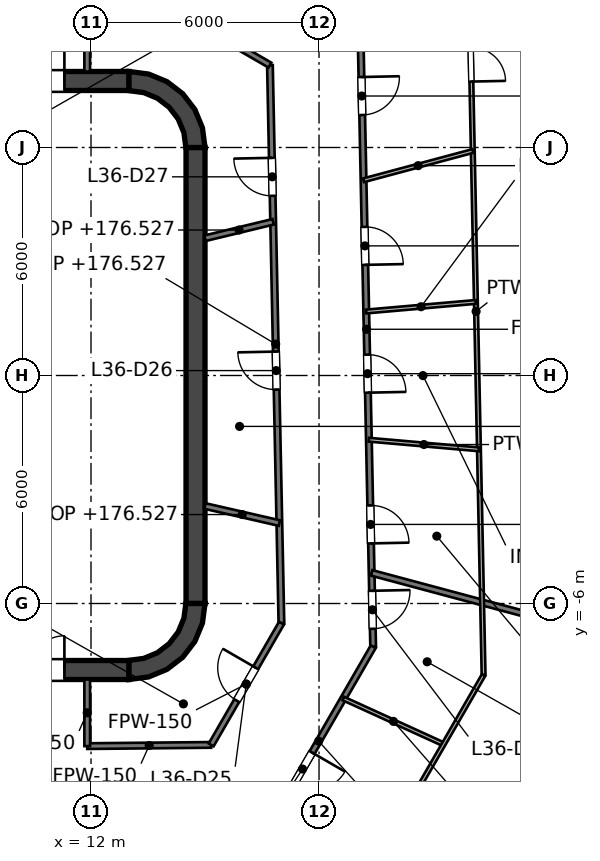
"""IFC4 building model, lengths in metres.
Left out: names, types, materials, properties, quantities, classifications, styles, units other than length and angle.
Written with IfcOpenShell. Run it as: python <this file> out.ifc"""

import sys

from ifc_helpers import new_model, si_unit, direction, frame, frame_2d, origin, place, context, subcontext, project, spatial, polyline, rectangle, outline, extrude, element, fill, save


model = new_model("IFC4")
c1 = context("Model", 3, precision=1e-05, world=origin(), true_north=direction((0.0, 1.0)))
c2 = subcontext(c1, "Body", "Model", "MODEL_VIEW")
j1 = project(units=[si_unit("LENGTHUNIT", "METRE"), si_unit("PLANEANGLEUNIT", "RADIAN")], contexts=[c1])
p1 = place(None, origin())
s1 = spatial("IfcSite", under=j1, at=p1, CompositionType="ELEMENT")
p2 = place(p1, origin())
s2 = spatial("IfcBuilding", under=s1, at=p2, CompositionType="ELEMENT")
p3 = place(p2, frame((0.0, 0.0, 173.6)))
s3 = spatial("IfcBuildingStorey", under=s2, at=p3, CompositionType="ELEMENT", Elevation=173.6)
p4 = place(p3, frame((-13.0, 7.75, 0.0), z_axis=(0.0, 0.0, 1.0), x_axis=(1.0, 0.0, 0.0)))
e1 = element("IfcWall", 1, at=p4, inside=s3, PredefinedType="SHEAR", context=c2, shape_type="SweptSolid", body=[
    extrude(rectangle(XDim=26.0, YDim=0.5, at=frame_2d((13.0, 0.0))), origin(), (0.0, 0.0, 1.0), 4.0),
])
p5 = place(p4, frame((1.7, 0.0, 0.0)))
e2 = element("IfcOpeningElement", 2, at=p5, cuts=e1, PredefinedType="OPENING", context=c2, shape_type="SweptSolid", body=[
    extrude(rectangle(XDim=1.8, YDim=2.1, at=frame_2d((0.9, 1.05))), frame((0.0, 0.25, 0.0), z_axis=(0.0, -1.0, 0.0), x_axis=(1.0, 0.0, 0.0)), (0.0, 0.0, 1.0), 0.5),
])
p6 = place(p4, frame((22.5, 0.0, 0.0)))
e3 = element("IfcOpeningElement", 3, at=p6, cuts=e1, PredefinedType="OPENING", context=c2, shape_type="SweptSolid", body=[
    extrude(rectangle(XDim=1.8, YDim=2.1, at=frame_2d((0.9, 1.05))), frame((0.0, 0.25, 0.0), z_axis=(0.0, -1.0, 0.0), x_axis=(1.0, 0.0, 0.0)), (0.0, 0.0, 1.0), 0.5),
])
p7 = place(p3, frame((-13.0, -7.75, 0.0), z_axis=(0.0, 0.0, 1.0), x_axis=(1.0, 0.0, 0.0)))
e4 = element("IfcWall", 4, at=p7, inside=s3, PredefinedType="SHEAR", context=c2, shape_type="SweptSolid", body=[
    extrude(rectangle(XDim=26.0, YDim=0.5, at=frame_2d((13.0, 0.0))), origin(), (0.0, 0.0, 1.0), 4.0),
])
p8 = place(p7, frame((1.7, 0.0, 0.0)))
e5 = element("IfcOpeningElement", 5, at=p8, cuts=e4, PredefinedType="OPENING", context=c2, shape_type="SweptSolid", body=[
    extrude(rectangle(XDim=1.8, YDim=2.1, at=frame_2d((0.9, 1.05))), frame((0.0, 0.25, 0.0), z_axis=(0.0, -1.0, 0.0), x_axis=(1.0, 0.0, 0.0)), (0.0, 0.0, 1.0), 0.5),
])
p9 = place(p7, frame((22.5, 0.0, 0.0)))
e6 = element("IfcOpeningElement", 6, at=p9, cuts=e4, PredefinedType="OPENING", context=c2, shape_type="SweptSolid", body=[
    extrude(rectangle(XDim=1.8, YDim=2.1, at=frame_2d((0.9, 1.05))), frame((0.0, 0.25, 0.0), z_axis=(0.0, -1.0, 0.0), x_axis=(1.0, 0.0, 0.0)), (0.0, 0.0, 1.0), 0.5),
])
p10 = place(p3, frame((14.75, -6.0, 0.0), z_axis=(0.0, 0.0, 1.0), x_axis=(0.0, 1.0, 0.0)))
e7 = element("IfcWall", 7, at=p10, inside=s3, PredefinedType="SHEAR", context=c2, shape_type="SweptSolid", body=[
    extrude(rectangle(XDim=12.0, YDim=0.5, at=frame_2d((6.0, 0.0))), origin(), (0.0, 0.0, 1.0), 4.0),
])
p11 = place(p3, origin())
e8 = element("IfcWall", 8, at=p11, inside=s3, PredefinedType="SHEAR", context=c2, shape_type="SweptSolid", body=[
    extrude(outline(polyline([(13.0, 8.0), (13.0, 7.496), (13.387, 7.445), (13.748, 7.295), (14.058, 7.058), (14.295, 6.748), (14.445, 6.387), (14.496, 6.0), (15.0, 6.0), (14.932, 6.518), (14.732, 7.0), (14.414, 7.414), (14.0, 7.732), (13.518, 7.932), (13.0, 8.0)])), origin(), (0.0, 0.0, 1.0), 4.0),
])
e9 = element("IfcWall", 9, at=p11, inside=s3, PredefinedType="SHEAR", context=c2, shape_type="SweptSolid", body=[
    extrude(outline(polyline([(15.0, -6.0), (14.496, -6.0), (14.445, -6.387), (14.295, -6.748), (14.058, -7.058), (13.748, -7.295), (13.387, -7.445), (13.0, -7.496), (13.0, -8.0), (13.518, -7.932), (14.0, -7.732), (14.414, -7.414), (14.732, -7.0), (14.932, -6.518), (15.0, -6.0)])), origin(), (0.0, 0.0, 1.0), 4.0),
])
p12 = place(p3, frame((11.8, -7.5, 0.0), z_axis=(0.0, 0.0, 1.0), x_axis=(0.0, 1.0, 0.0)))
e10 = element("IfcWall", 10, at=p12, inside=s3, PredefinedType="SOLIDWALL", context=c2, shape_type="SweptSolid", body=[
    extrude(rectangle(XDim=15.0, YDim=0.4, at=frame_2d((7.5, 0.0))), origin(), (0.0, 0.0, 1.0), 3.85),
])
p13 = place(p12, frame((11.3, 0.0, 0.0)))
e11 = element("IfcOpeningElement", 11, at=p13, cuts=e10, PredefinedType="OPENING", context=c2, shape_type="SweptSolid", body=[
    extrude(rectangle(XDim=1.1, YDim=2.1, at=frame_2d((0.55, 1.05))), frame((0.0, 0.2, 0.0), z_axis=(0.0, -1.0, 0.0), x_axis=(1.0, 0.0, 0.0)), (0.0, 0.0, 1.0), 0.4),
])
p14 = place(p12, frame((8.4, 0.0, 0.0)))
e12 = element("IfcOpeningElement", 12, at=p14, cuts=e10, PredefinedType="OPENING", context=c2, shape_type="SweptSolid", body=[
    extrude(rectangle(XDim=1.1, YDim=2.1, at=frame_2d((0.55, 1.05))), frame((0.0, 0.2, 0.0), z_axis=(0.0, -1.0, 0.0), x_axis=(1.0, 0.0, 0.0)), (0.0, 0.0, 1.0), 0.4),
])
p15 = place(p12, frame((5.5, 0.0, 0.0)))
e13 = element("IfcOpeningElement", 13, at=p15, cuts=e10, PredefinedType="OPENING", context=c2, shape_type="SweptSolid", body=[
    extrude(rectangle(XDim=1.1, YDim=2.1, at=frame_2d((0.55, 1.05))), frame((0.0, 0.2, 0.0), z_axis=(0.0, -1.0, 0.0), x_axis=(1.0, 0.0, 0.0)), (0.0, 0.0, 1.0), 0.4),
])
p16 = place(p12, frame((13.697, 0.0, 0.0)))
e14 = element("IfcOpeningElement", 14, at=p16, cuts=e10, PredefinedType="OPENING", context=c2, shape_type="SweptSolid", body=[
    extrude(rectangle(XDim=0.9, YDim=2.1, at=frame_2d((0.45, 1.05))), frame((0.0, 0.2, 0.0), z_axis=(0.0, -1.0, 0.0), x_axis=(1.0, 0.0, 0.0)), (0.0, 0.0, 1.0), 0.4),
])
p17 = place(p12, frame((0.403, 0.0, 0.0)))
e15 = element("IfcOpeningElement", 15, at=p17, cuts=e10, PredefinedType="OPENING", context=c2, shape_type="SweptSolid", body=[
    extrude(rectangle(XDim=0.9, YDim=2.1, at=frame_2d((0.45, 1.05))), frame((0.0, 0.2, 0.0), z_axis=(0.0, -1.0, 0.0), x_axis=(1.0, 0.0, 0.0)), (0.0, 0.0, 1.0), 0.4),
])
e16 = element("IfcWall", 16, at=p11, inside=s3, PredefinedType="SOLIDWALL", context=c2, shape_type="SweptSolid", body=[
    extrude(outline(polyline([(12.0, -5.675), (12.0, -5.925), (14.25, -5.925), (14.5, -5.925), (14.5, -5.675), (14.5, -3.025), (14.5, -2.775), (14.5, -0.125), (14.5, 0.125), (14.5, 2.775), (14.5, 3.025), (14.5, 5.675), (14.5, 5.925), (14.25, 5.925), (12.0, 5.925), (12.0, 5.675), (14.25, 5.675), (14.25, 3.025), (12.0, 3.025), (12.0, 2.775), (14.25, 2.775), (14.25, 0.125), (12.0, 0.125), (12.0, -0.125), (14.25, -0.125), (14.25, -2.775), (12.0, -2.775), (12.0, -3.025), (14.25, -3.025), (14.25, -5.675), (12.0, -5.675)])), origin(), (0.0, 0.0, 1.0), 3.85),
])
p18 = place(p3, frame((16.708, 8.168, 0.0), z_axis=(0.0, 0.0, 1.0), x_axis=(0.020577520638, -0.999788260405, 0.0)))
e17 = element("IfcWall", 17, at=p18, inside=s3, PredefinedType="PARTITIONING", context=c2, shape_type="SweptSolid", body=[
    extrude(rectangle(XDim=14.688, YDim=0.15, at=frame_2d((7.344, 0.0))), origin(), (0.0, 0.0, 1.0), 2.927),
])
p19 = place(p18, frame((7.54, 0.0, 0.0)))
e18 = element("IfcOpeningElement", 18, at=p19, cuts=e17, PredefinedType="OPENING", context=c2, shape_type="SweptSolid", body=[
    extrude(rectangle(XDim=1.0, YDim=2.1, at=frame_2d((0.5, 1.05))), frame((0.0, 0.075, 0.0), z_axis=(0.0, -1.0, 0.0), x_axis=(1.0, 0.0, 0.0)), (0.0, 0.0, 1.0), 0.15),
])
p20 = place(p18, frame((2.44, 0.0, 0.0)))
e19 = element("IfcOpeningElement", 19, at=p20, cuts=e17, PredefinedType="OPENING", context=c2, shape_type="SweptSolid", body=[
    extrude(rectangle(XDim=1.0, YDim=2.1, at=frame_2d((0.5, 1.05))), frame((0.0, 0.075, 0.0), z_axis=(0.0, -1.0, 0.0), x_axis=(1.0, 0.0, 0.0)), (0.0, 0.0, 1.0), 0.15),
])
p21 = place(p3, frame((19.08, 9.57, 0.0), z_axis=(0.0, 0.0, 1.0), x_axis=(0.020585419538, -0.9997880978, 0.0)))
e20 = element("IfcWall", 20, at=p21, inside=s3, PredefinedType="PARTITIONING", context=c2, shape_type="SweptSolid", body=[
    extrude(rectangle(XDim=16.711, YDim=0.15, at=frame_2d((8.355, 0.0))), origin(), (0.0, 0.0, 1.0), 2.927),
])
p22 = place(p21, frame((15.239, 0.0, 0.0)))
e21 = element("IfcOpeningElement", 21, at=p22, cuts=e20, PredefinedType="OPENING", context=c2, shape_type="SweptSolid", body=[
    extrude(rectangle(XDim=1.0, YDim=2.1, at=frame_2d((0.5, 1.05))), frame((0.0, 0.075, 0.0), z_axis=(0.0, -1.0, 0.0), x_axis=(1.0, 0.0, 0.0)), (0.0, 0.0, 1.0), 0.15),
])
p23 = place(p21, frame((12.992, 0.0, 0.0)))
e22 = element("IfcOpeningElement", 22, at=p23, cuts=e20, PredefinedType="OPENING", context=c2, shape_type="SweptSolid", body=[
    extrude(rectangle(XDim=1.0, YDim=2.1, at=frame_2d((0.5, 1.05))), frame((0.0, 0.075, 0.0), z_axis=(0.0, -1.0, 0.0), x_axis=(1.0, 0.0, 0.0)), (0.0, 0.0, 1.0), 0.15),
])
p24 = place(p21, frame((9.024, 0.0, 0.0)))
e23 = element("IfcOpeningElement", 23, at=p24, cuts=e20, PredefinedType="OPENING", context=c2, shape_type="SweptSolid", body=[
    extrude(rectangle(XDim=1.0, YDim=2.1, at=frame_2d((0.5, 1.05))), frame((0.0, 0.075, 0.0), z_axis=(0.0, -1.0, 0.0), x_axis=(1.0, 0.0, 0.0)), (0.0, 0.0, 1.0), 0.15),
])
p25 = place(p21, frame((5.66, 0.0, 0.0)))
e24 = element("IfcOpeningElement", 24, at=p25, cuts=e20, PredefinedType="OPENING", context=c2, shape_type="SweptSolid", body=[
    extrude(rectangle(XDim=1.0, YDim=2.1, at=frame_2d((0.5, 1.05))), frame((0.0, 0.075, 0.0), z_axis=(0.0, -1.0, 0.0), x_axis=(1.0, 0.0, 0.0)), (0.0, 0.0, 1.0), 0.15),
])
p26 = place(p21, frame((1.716, 0.0, 0.0)))
e25 = element("IfcOpeningElement", 25, at=p26, cuts=e20, PredefinedType="OPENING", context=c2, shape_type="SweptSolid", body=[
    extrude(rectangle(XDim=1.0, YDim=2.1, at=frame_2d((0.5, 1.05))), frame((0.0, 0.075, 0.0), z_axis=(0.0, -1.0, 0.0), x_axis=(1.0, 0.0, 0.0)), (0.0, 0.0, 1.0), 0.15),
])
p27 = place(p3, frame((13.527, 10.005, 0.0), z_axis=(0.0, 0.0, 1.0), x_axis=(0.865976376876, -0.500084907484, 0.0)))
e26 = element("IfcWall", 26, at=p27, inside=s3, PredefinedType="PARTITIONING", context=c2, shape_type="SweptSolid", body=[
    extrude(rectangle(XDim=3.673, YDim=0.15, at=frame_2d((1.836, 0.0))), origin(), (0.0, 0.0, 1.0), 2.995),
])
p28 = place(p3, frame((19.384, -5.194, 0.0), z_axis=(0.0, 0.0, 1.0), x_axis=(0.965934913918, -0.258785127227, 0.0)))
e27 = element("IfcWall", 27, at=p28, inside=s3, PredefinedType="PARTITIONING", context=c2, shape_type="SweptSolid", body=[
    extrude(rectangle(XDim=10.368, YDim=0.15, at=frame_2d((5.184, 0.0))), origin(), (0.0, 0.0, 1.0), 3.527),
])
p29 = place(p3, frame((15.0, -3.435, 0.0), z_axis=(0.0, 0.0, 1.0), x_axis=(0.974785245705, -0.223145075582, 0.0)))
e28 = element("IfcWall", 28, at=p29, inside=s3, PredefinedType="PARTITIONING", context=c2, shape_type="SweptSolid", body=[
    extrude(rectangle(XDim=2.008, YDim=0.15, at=frame_2d((1.004, 0.0))), origin(), (0.0, 0.0, 1.0), 2.927),
])
p30 = place(p3, frame((11.9, -9.753, 0.0), z_axis=(0.0, 0.0, 1.0), x_axis=(0.999951172082, 0.009881976096, 0.0)))
e29 = element("IfcWall", 29, at=p30, inside=s3, PredefinedType="PARTITIONING", context=c2, shape_type="SweptSolid", body=[
    extrude(rectangle(XDim=3.261, YDim=0.15, at=frame_2d((1.631, 0.0))), origin(), (0.0, 0.0, 1.0), 2.995),
])
p31 = place(p3, frame((15.0, 3.612, 0.0), z_axis=(0.0, 0.0, 1.0), x_axis=(0.972133200519, 0.234429180027, 0.0)))
e30 = element("IfcWall", 30, at=p31, inside=s3, PredefinedType="PARTITIONING", context=c2, shape_type="SweptSolid", body=[
    extrude(rectangle(XDim=1.844, YDim=0.15, at=frame_2d((0.922, 0.0))), origin(), (0.0, 0.0, 1.0), 2.927),
])
p32 = place(p3, frame((16.555, -12.107, 0.0), z_axis=(0.0, 0.0, 1.0), x_axis=(0.500279724306, 0.865863844636, 0.0)))
e31 = element("IfcWall", 31, at=p32, inside=s3, PredefinedType="PARTITIONING", context=c2, shape_type="SweptSolid", body=[
    extrude(rectangle(XDim=5.739, YDim=0.15, at=frame_2d((2.869, 0.0))), origin(), (0.0, 0.0, 1.0), 2.995),
])
p33 = place(p32, frame((1.522, 0.0, 0.0)))
e32 = element("IfcOpeningElement", 32, at=p33, cuts=e31, PredefinedType="OPENING", context=c2, shape_type="SweptSolid", body=[
    extrude(rectangle(XDim=1.0, YDim=2.1, at=frame_2d((0.5, 1.05))), frame((0.0, 0.075, 0.0), z_axis=(0.0, -1.0, 0.0), x_axis=(1.0, 0.0, 0.0)), (0.0, 0.0, 1.0), 0.15),
])
p34 = place(p3, frame((15.161, -9.721, 0.0), z_axis=(0.0, 0.0, 1.0), x_axis=(0.500276498434, 0.865865708476, 0.0)))
e33 = element("IfcWall", 33, at=p34, inside=s3, PredefinedType="PARTITIONING", context=c2, shape_type="SweptSolid", body=[
    extrude(rectangle(XDim=3.7, YDim=0.15, at=frame_2d((1.85, 0.0))), origin(), (0.0, 0.0, 1.0), 2.995),
])
p35 = place(p34, frame((1.345, 0.0, 0.0)))
e34 = element("IfcOpeningElement", 34, at=p35, cuts=e33, PredefinedType="OPENING", context=c2, shape_type="SweptSolid", body=[
    extrude(rectangle(XDim=1.0, YDim=2.1, at=frame_2d((0.5, 1.05))), frame((0.0, 0.075, 0.0), z_axis=(0.0, -1.0, 0.0), x_axis=(1.0, 0.0, 0.0)), (0.0, 0.0, 1.0), 0.15),
])
p36 = place(p3, frame((11.9, -9.753, 0.0), z_axis=(0.0, 0.0, 1.0), x_axis=(0.0, 1.0, 0.0)))
e35 = element("IfcWall", 35, at=p36, inside=s3, PredefinedType="PARTITIONING", context=c2, shape_type="SweptSolid", body=[
    extrude(rectangle(XDim=1.753, YDim=0.15, at=frame_2d((0.876, 0.0))), origin(), (0.0, 0.0, 1.0), 2.995),
])
p37 = place(p3, frame((11.9, 8.0, 0.0), z_axis=(0.0, 0.0, 1.0), x_axis=(0.0, 1.0, 0.0)))
e36 = element("IfcWall", 36, at=p37, inside=s3, PredefinedType="PARTITIONING", context=c2, shape_type="SweptSolid", body=[
    extrude(rectangle(XDim=1.978, YDim=0.15, at=frame_2d((0.989, 0.0))), origin(), (0.0, 0.0, 1.0), 2.995),
])
p38 = place(p3, frame((21.936, 11.258, 0.0), z_axis=(0.0, 0.0, 1.0), x_axis=(0.020580799217, -0.999788192921, 0.0)))
e37 = element("IfcWall", 37, at=p38, inside=s3, PredefinedType="PARTITIONING", context=c2, shape_type="SweptSolid", body=[
    extrude(rectangle(XDim=19.146, YDim=0.1, at=frame_2d((9.573, 0.0))), origin(), (0.0, 0.0, 1.0), 2.927),
])
p39 = place(p38, frame((1.724, 0.0, 0.0)))
e38 = element("IfcOpeningElement", 38, at=p39, cuts=e37, PredefinedType="OPENING", context=c2, shape_type="SweptSolid", body=[
    extrude(rectangle(XDim=1.8, YDim=2.1, at=frame_2d((0.9, 1.05))), frame((0.0, 0.05, 0.0), z_axis=(0.0, -1.0, 0.0), x_axis=(1.0, 0.0, 0.0)), (0.0, 0.0, 1.0), 0.1),
])
p40 = place(p3, frame((18.637, -8.5, 0.0), z_axis=(0.0, 0.0, 1.0), x_axis=(0.909830186203, -0.414980761329, 0.0)))
e39 = element("IfcWall", 39, at=p40, inside=s3, PredefinedType="PARTITIONING", context=c2, shape_type="SweptSolid", body=[
    extrude(rectangle(XDim=2.904, YDim=0.1, at=frame_2d((1.452, 0.0))), origin(), (0.0, 0.0, 1.0), 3.85),
])
p41 = place(p3, frame((19.312, -1.69, 0.0), z_axis=(0.0, 0.0, 1.0), x_axis=(0.9962004602, -0.087089856452, 0.0)))
e40 = element("IfcWall", 40, at=p41, inside=s3, PredefinedType="PARTITIONING", context=c2, shape_type="SweptSolid", body=[
    extrude(rectangle(XDim=2.907, YDim=0.1, at=frame_2d((1.454, 0.0))), origin(), (0.0, 0.0, 1.0), 3.85),
])
p42 = place(p3, frame((19.242, 1.684, 0.0), z_axis=(0.0, 0.0, 1.0), x_axis=(0.99621080415, 0.086971453336, 0.0)))
e41 = element("IfcWall", 41, at=p42, inside=s3, PredefinedType="PARTITIONING", context=c2, shape_type="SweptSolid", body=[
    extrude(rectangle(XDim=2.897, YDim=0.1, at=frame_2d((1.448, 0.0))), origin(), (0.0, 0.0, 1.0), 3.85),
])
p43 = place(p3, frame((19.171, 5.137, 0.0), z_axis=(0.0, 0.0, 1.0), x_axis=(0.965953908608, 0.25871421771, 0.0)))
e42 = element("IfcWall", 42, at=p43, inside=s3, PredefinedType="PARTITIONING", context=c2, shape_type="SweptSolid", body=[
    extrude(rectangle(XDim=2.976, YDim=0.1, at=frame_2d((1.488, 0.0))), origin(), (0.0, 0.0, 1.0), 3.85),
])
p44 = place(p3, frame((18.233, -14.98, 0.0), z_axis=(0.0, 0.0, 1.0), x_axis=(0.499914179464, 0.866074946625, 0.0)))
e43 = element("IfcWall", 43, at=p44, inside=s3, PredefinedType="PARTITIONING", context=c2, shape_type="SweptSolid", body=[
    extrude(rectangle(XDim=8.194, YDim=0.1, at=frame_2d((4.097, 0.0))), origin(), (0.0, 0.0, 1.0), 2.995),
])
p45 = place(p13, origin())
e44 = element("IfcDoor", 44, at=p45, inside=s3, OperationType="DOUBLE_DOOR_SLIDING", PredefinedType="DOOR", context=c2, shape_type="SweptSolid", body=[
    extrude(rectangle(XDim=1.1, YDim=2.1, at=frame_2d((0.55, 1.05))), frame((0.0, 0.025, 0.0), z_axis=(0.0, -1.0, 0.0), x_axis=(1.0, 0.0, 0.0)), (0.0, 0.0, 1.0), 0.05),
])
fill(e11, e44)
p46 = place(p14, origin())
e45 = element("IfcDoor", 45, at=p46, inside=s3, OperationType="DOUBLE_DOOR_SLIDING", PredefinedType="DOOR", context=c2, shape_type="SweptSolid", body=[
    extrude(rectangle(XDim=1.1, YDim=2.1, at=frame_2d((0.55, 1.05))), frame((0.0, 0.025, 0.0), z_axis=(0.0, -1.0, 0.0), x_axis=(1.0, 0.0, 0.0)), (0.0, 0.0, 1.0), 0.05),
])
fill(e12, e45)
p47 = place(p15, origin())
e46 = element("IfcDoor", 46, at=p47, inside=s3, OperationType="DOUBLE_DOOR_SLIDING", PredefinedType="DOOR", context=c2, shape_type="SweptSolid", body=[
    extrude(rectangle(XDim=1.1, YDim=2.1, at=frame_2d((0.55, 1.05))), frame((0.0, 0.025, 0.0), z_axis=(0.0, -1.0, 0.0), x_axis=(1.0, 0.0, 0.0)), (0.0, 0.0, 1.0), 0.05),
])
fill(e13, e46)
p48 = place(p16, origin())
e47 = element("IfcDoor", 47, at=p48, inside=s3, OperationType="SINGLE_SWING_RIGHT", PredefinedType="DOOR", context=c2, shape_type="SweptSolid", body=[
    extrude(rectangle(XDim=0.9, YDim=2.1, at=frame_2d((0.45, 1.05))), frame((0.0, 0.025, 0.0), z_axis=(0.0, -1.0, 0.0), x_axis=(1.0, 0.0, 0.0)), (0.0, 0.0, 1.0), 0.05),
])
fill(e14, e47)
p49 = place(p17, origin())
e48 = element("IfcDoor", 48, at=p49, inside=s3, OperationType="SINGLE_SWING_RIGHT", PredefinedType="DOOR", context=c2, shape_type="SweptSolid", body=[
    extrude(rectangle(XDim=0.9, YDim=2.1, at=frame_2d((0.45, 1.05))), frame((0.0, 0.025, 0.0), z_axis=(0.0, -1.0, 0.0), x_axis=(1.0, 0.0, 0.0)), (0.0, 0.0, 1.0), 0.05),
])
fill(e15, e48)
p50 = place(p6, origin())
e49 = element("IfcDoor", 49, at=p50, inside=s3, OperationType="DOUBLE_DOOR_SINGLE_SWING", PredefinedType="DOOR", context=c2, shape_type="SweptSolid", body=[
    extrude(rectangle(XDim=1.8, YDim=2.1, at=frame_2d((0.9, 1.05))), frame((0.0, 0.025, 0.0), z_axis=(0.0, -1.0, 0.0), x_axis=(1.0, 0.0, 0.0)), (0.0, 0.0, 1.0), 0.05),
])
fill(e3, e49)
p51 = place(p9, origin())
e50 = element("IfcDoor", 50, at=p51, inside=s3, OperationType="DOUBLE_DOOR_SINGLE_SWING", PredefinedType="DOOR", context=c2, shape_type="SweptSolid", body=[
    extrude(rectangle(XDim=1.8, YDim=2.1, at=frame_2d((0.9, 1.05))), frame((0.0, 0.025, 0.0), z_axis=(0.0, -1.0, 0.0), x_axis=(1.0, 0.0, 0.0)), (0.0, 0.0, 1.0), 0.05),
])
fill(e6, e50)
p52 = place(p35, origin())
e51 = element("IfcDoor", 51, at=p52, inside=s3, OperationType="SINGLE_SWING_RIGHT", PredefinedType="DOOR", context=c2, shape_type="SweptSolid", body=[
    extrude(rectangle(XDim=1.0, YDim=2.1, at=frame_2d((0.5, 1.05))), frame((0.0, 0.025, 0.0), z_axis=(0.0, -1.0, 0.0), x_axis=(1.0, 0.0, 0.0)), (0.0, 0.0, 1.0), 0.05),
])
fill(e34, e51)
p53 = place(p19, origin())
e52 = element("IfcDoor", 52, at=p53, inside=s3, OperationType="SINGLE_SWING_LEFT", PredefinedType="DOOR", context=c2, shape_type="SweptSolid", body=[
    extrude(rectangle(XDim=1.0, YDim=2.1, at=frame_2d((0.5, 1.05))), frame((0.0, 0.025, 0.0), z_axis=(0.0, -1.0, 0.0), x_axis=(1.0, 0.0, 0.0)), (0.0, 0.0, 1.0), 0.05),
])
fill(e18, e52)
p54 = place(p20, origin())
e53 = element("IfcDoor", 53, at=p54, inside=s3, OperationType="SINGLE_SWING_LEFT", PredefinedType="DOOR", context=c2, shape_type="SweptSolid", body=[
    extrude(rectangle(XDim=1.0, YDim=2.1, at=frame_2d((0.5, 1.05))), frame((0.0, 0.025, 0.0), z_axis=(0.0, -1.0, 0.0), x_axis=(1.0, 0.0, 0.0)), (0.0, 0.0, 1.0), 0.05),
])
fill(e19, e53)
p55 = place(p33, origin())
e54 = element("IfcDoor", 54, at=p55, inside=s3, OperationType="SINGLE_SWING_RIGHT", PredefinedType="DOOR", context=c2, shape_type="SweptSolid", body=[
    extrude(rectangle(XDim=1.0, YDim=2.1, at=frame_2d((0.5, 1.05))), frame((0.0, 0.025, 0.0), z_axis=(0.0, -1.0, 0.0), x_axis=(1.0, 0.0, 0.0)), (0.0, 0.0, 1.0), 0.05),
])
fill(e32, e54)
p56 = place(p22, origin())
e55 = element("IfcDoor", 55, at=p56, inside=s3, OperationType="SINGLE_SWING_LEFT", PredefinedType="DOOR", context=c2, shape_type="SweptSolid", body=[
    extrude(rectangle(XDim=1.0, YDim=2.1, at=frame_2d((0.5, 1.05))), frame((0.0, 0.025, 0.0), z_axis=(0.0, -1.0, 0.0), x_axis=(1.0, 0.0, 0.0)), (0.0, 0.0, 1.0), 0.05),
])
fill(e21, e55)
p57 = place(p23, origin())
e56 = element("IfcDoor", 56, at=p57, inside=s3, OperationType="SINGLE_SWING_RIGHT", PredefinedType="DOOR", context=c2, shape_type="SweptSolid", body=[
    extrude(rectangle(XDim=1.0, YDim=2.1, at=frame_2d((0.5, 1.05))), frame((0.0, 0.025, 0.0), z_axis=(0.0, -1.0, 0.0), x_axis=(1.0, 0.0, 0.0)), (0.0, 0.0, 1.0), 0.05),
])
fill(e22, e56)
p58 = place(p24, origin())
e57 = element("IfcDoor", 57, at=p58, inside=s3, OperationType="SINGLE_SWING_RIGHT", PredefinedType="DOOR", context=c2, shape_type="SweptSolid", body=[
    extrude(rectangle(XDim=1.0, YDim=2.1, at=frame_2d((0.5, 1.05))), frame((0.0, 0.025, 0.0), z_axis=(0.0, -1.0, 0.0), x_axis=(1.0, 0.0, 0.0)), (0.0, 0.0, 1.0), 0.05),
])
fill(e23, e57)
p59 = place(p25, origin())
e58 = element("IfcDoor", 58, at=p59, inside=s3, OperationType="SINGLE_SWING_RIGHT", PredefinedType="DOOR", context=c2, shape_type="SweptSolid", body=[
    extrude(rectangle(XDim=1.0, YDim=2.1, at=frame_2d((0.5, 1.05))), frame((0.0, 0.025, 0.0), z_axis=(0.0, -1.0, 0.0), x_axis=(1.0, 0.0, 0.0)), (0.0, 0.0, 1.0), 0.05),
])
fill(e24, e58)
p60 = place(p26, origin())
e59 = element("IfcDoor", 59, at=p60, inside=s3, OperationType="SINGLE_SWING_LEFT", PredefinedType="DOOR", context=c2, shape_type="SweptSolid", body=[
    extrude(rectangle(XDim=1.0, YDim=2.1, at=frame_2d((0.5, 1.05))), frame((0.0, 0.025, 0.0), z_axis=(0.0, -1.0, 0.0), x_axis=(1.0, 0.0, 0.0)), (0.0, 0.0, 1.0), 0.05),
])
fill(e25, e59)
p61 = place(p39, origin())
e60 = element("IfcDoor", 60, at=p61, inside=s3, OperationType="DOUBLE_DOOR_SINGLE_SWING", PredefinedType="DOOR", context=c2, shape_type="SweptSolid", body=[
    extrude(rectangle(XDim=1.8, YDim=2.1, at=frame_2d((0.9, 1.05))), frame((0.0, 0.025, 0.0), z_axis=(0.0, -1.0, 0.0), x_axis=(1.0, 0.0, 0.0)), (0.0, 0.0, 1.0), 0.05),
])
fill(e38, e60)
save(model, sys.argv[1])
